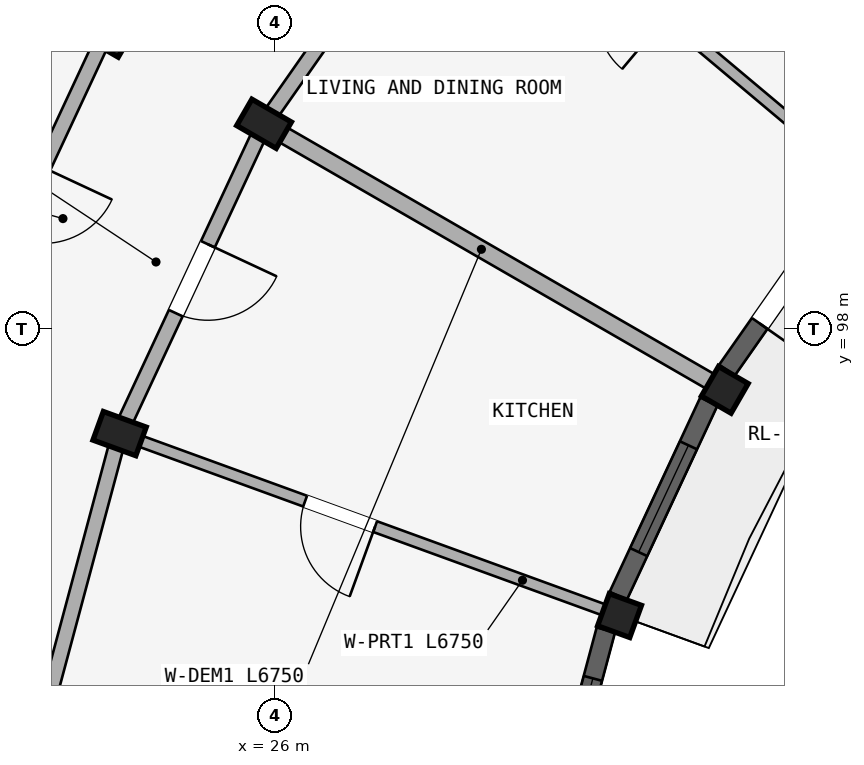
"""IFC4 building model, lengths in metres.
Left out: names, types, materials, properties, quantities, classifications, styles, units other than length and angle.
Written with IfcOpenShell. Run it as: python <this file> out.ifc"""

import sys

from ifc_helpers import new_model, si_unit, direction, frame, frame_2d, origin, origin_2d, place, context, subcontext, project, spatial, rectangle, extrude, element, fill, save


model = new_model("IFC4")
c1 = context("Model", 3, precision=1e-05, world=origin(), true_north=direction((0.0, 1.0)))
c2 = subcontext(c1, "Body", "Model", "MODEL_VIEW")
j1 = project(units=[si_unit("LENGTHUNIT", "METRE"), si_unit("PLANEANGLEUNIT", "RADIAN")], contexts=[c1])
p1 = place(None, origin())
s1 = spatial("IfcSite", under=j1, at=p1, CompositionType="ELEMENT")
p2 = place(p1, origin())
s2 = spatial("IfcBuilding", under=s1, at=p2, CompositionType="ELEMENT")
p3 = place(p2, frame((0.0, 0.0, 49.65)))
s3 = spatial("IfcBuildingStorey", under=s2, at=p3, CompositionType="ELEMENT", Elevation=49.65)
p4 = place(p3, frame((31.919, 97.2, 0.0), z_axis=(0.0, 0.0, 1.0), x_axis=(0.5, 0.866025403784, 0.0)))
e1 = element("IfcColumn", 1, at=p4, inside=s3, PredefinedType="COLUMN", context=c2, shape_type="SweptSolid", body=[
    extrude(rectangle(XDim=0.45, YDim=0.45, at=origin_2d()), origin(), (0.0, 0.0, 1.0), 2.91),
])
for number, where, z_axis, x_axis in (
    (2, (25.856, 100.7, 0.0), (0.0, 0.0, 1.0), (0.5, 0.866, 0.0)),
    (3, (23.778, 101.9, 0.0), (0.0, 0.0, 1.0), (0.5, 0.866, 0.0)),
):
    element("IfcColumn", number, at=place(p3, frame(where, z_axis=z_axis, x_axis=x_axis)), inside=s3, PredefinedType="COLUMN", context=c2, shape_type="SweptSolid", body=[
        extrude(rectangle(XDim=0.4, YDim=0.6, at=origin_2d()), origin(), (0.0, 0.0, 1.0), 2.91),
    ])
p5 = place(p3, frame((30.534, 94.23, 0.0), z_axis=(0.0, 0.0, 1.0), x_axis=(0.342020143326, 0.939692620786, 0.0)))
e4 = element("IfcColumn", 4, at=p5, inside=s3, PredefinedType="COLUMN", context=c2, shape_type="SweptSolid", body=[
    extrude(rectangle(XDim=0.45, YDim=0.45, at=origin_2d()), origin(), (0.0, 0.0, 1.0), 2.91),
])
p6 = place(p3, frame((23.956, 96.624, 0.0), z_axis=(0.0, 0.0, 1.0), x_axis=(0.342020143326, 0.939692620786, 0.0)))
e5 = element("IfcColumn", 5, at=p6, inside=s3, PredefinedType="COLUMN", context=c2, shape_type="SweptSolid", body=[
    extrude(rectangle(XDim=0.4, YDim=0.6, at=origin_2d()), origin(), (0.0, 0.0, 1.0), 2.91),
])
p7 = place(p3, frame((28.436, 104.384, 0.0), z_axis=(0.0, 0.0, 1.0), x_axis=(-0.573571637217, -0.819155404658, 0.0)))
e6 = element("IfcWall", 6, at=p7, inside=s3, PredefinedType="STANDARD", context=c2, shape_type="SweptSolid", body=[
    extrude(rectangle(XDim=4.497, YDim=0.2, at=frame_2d((2.249, 0.0))), origin(), (0.0, 0.0, 1.0), 2.352),
])
p8 = place(p3, frame((25.856, 100.7, 0.0), z_axis=(0.0, 0.0, 1.0), x_axis=(-0.422617978463, -0.906307919131, 0.0)))
e7 = element("IfcWall", 7, at=p8, inside=s3, PredefinedType="STANDARD", context=c2, shape_type="SweptSolid", body=[
    extrude(rectangle(XDim=4.497, YDim=0.2, at=frame_2d((2.249, 0.0))), origin(), (0.0, 0.0, 1.0), 2.352),
])
p9 = place(p8, frame((1.749, 0.0, 0.0)))
e8 = element("IfcOpeningElement", 8, at=p9, cuts=e7, PredefinedType="OPENING", context=c2, shape_type="SweptSolid", body=[
    extrude(rectangle(XDim=1.0, YDim=2.15, at=frame_2d((0.5, 1.075))), frame((0.0, 0.11, 0.0), z_axis=(0.0, -1.0, 0.0), x_axis=(1.0, 0.0, 0.0)), (0.0, 0.0, 1.0), 0.22),
])
p10 = place(p3, frame((23.778, 101.9, 0.0), z_axis=(0.0, 0.0, 1.0), x_axis=(-0.422629854778, -0.906302381024, 0.0)))
e9 = element("IfcWall", 9, at=p10, inside=s3, PredefinedType="STANDARD", context=c2, shape_type="SweptSolid", body=[
    extrude(rectangle(XDim=4.915, YDim=0.2, at=frame_2d((2.458, 0.0))), origin(), (0.0, 0.0, 1.0), 2.352),
])
p11 = place(p10, frame((1.958, 0.0, 0.0)))
e10 = element("IfcOpeningElement", 10, at=p11, cuts=e9, PredefinedType="OPENING", context=c2, shape_type="SweptSolid", body=[
    extrude(rectangle(XDim=1.0, YDim=2.15, at=frame_2d((0.5, 1.075))), frame((0.0, 0.11, 0.0), z_axis=(0.0, -1.0, 0.0), x_axis=(1.0, 0.0, 0.0)), (0.0, 0.0, 1.0), 0.22),
])
p12 = place(p3, frame((23.956, 96.624, 0.0), z_axis=(0.0, 0.0, 1.0), x_axis=(-0.258787642463, -0.965934240054, 0.0)))
e11 = element("IfcWall", 11, at=p12, inside=s3, PredefinedType="STANDARD", context=c2, shape_type="SweptSolid", body=[
    extrude(rectangle(XDim=4.497, YDim=0.2, at=frame_2d((2.249, 0.0))), origin(), (0.0, 0.0, 1.0), 2.352),
])
p13 = place(p3, frame((33.645, 100.013, 0.0), z_axis=(0.0, 0.0, 1.0), x_axis=(-0.766046761698, 0.642784846501, 0.0)))
e12 = element("IfcWall", 12, at=p13, inside=s3, PredefinedType="PARTITIONING", context=c2, shape_type="SweptSolid", body=[
    extrude(rectangle(XDim=6.75, YDim=0.15, at=frame_2d((3.375, 0.0))), origin(), (0.0, 0.0, 1.0), 2.352),
])
p14 = place(p13, frame((3.262, 0.0, 0.0)))
e13 = element("IfcOpeningElement", 13, at=p14, cuts=e12, PredefinedType="OPENING", context=c2, shape_type="SweptSolid", body=[
    extrude(rectangle(XDim=0.9, YDim=2.1, at=frame_2d((0.45, 1.05))), frame((0.0, 0.085, 0.0), z_axis=(0.0, -1.0, 0.0), x_axis=(1.0, 0.0, 0.0)), (0.0, 0.0, 1.0), 0.17),
])
p15 = place(p3, frame((31.746, 97.3, 0.0), z_axis=(0.0, 0.0, 1.0), x_axis=(-0.866026575979, 0.499997969693, 0.0)))
e14 = element("IfcWall", 14, at=p15, inside=s3, PredefinedType="STANDARD", context=c2, shape_type="SweptSolid", body=[
    extrude(rectangle(XDim=6.75, YDim=0.22, at=frame_2d((3.375, 0.0))), origin(), (0.0, 0.0, 1.0), 2.352),
])
p16 = place(p3, frame((30.346, 94.298, 0.0), z_axis=(0.0, 0.0, 1.0), x_axis=(-0.939696231917, 0.342010221662, 0.0)))
e15 = element("IfcWall", 15, at=p16, inside=s3, PredefinedType="PARTITIONING", context=c2, shape_type="SweptSolid", body=[
    extrude(rectangle(XDim=6.75, YDim=0.15, at=frame_2d((3.375, 0.0))), origin(), (0.0, 0.0, 1.0), 2.352),
])
p17 = place(p16, frame((3.222, 0.0, 0.0)))
e16 = element("IfcOpeningElement", 16, at=p17, cuts=e15, PredefinedType="OPENING", context=c2, shape_type="SweptSolid", body=[
    extrude(rectangle(XDim=0.98, YDim=2.12, at=frame_2d((0.49, 1.06))), frame((0.0, 0.085, 0.0), z_axis=(0.0, -1.0, 0.0), x_axis=(1.0, 0.0, 0.0)), (0.0, 0.0, 1.0), 0.17),
])
p18 = place(p3, frame((33.565, 99.769, 0.0), z_axis=(0.0, 0.0, 1.0), x_axis=(-0.573572722716, -0.819154644592, 0.0)))
e17 = element("IfcWall", 17, at=p18, inside=s3, PredefinedType="STANDARD", context=c2, shape_type="SweptSolid", body=[
    extrude(rectangle(XDim=2.82, YDim=0.25, at=frame_2d((1.41, 0.0))), origin(), (0.0, 0.0, 1.0), 2.402),
])
p19 = place(p18, frame((0.75, 0.0, 0.0)))
e18 = element("IfcOpeningElement", 18, at=p19, cuts=e17, PredefinedType="OPENING", context=c2, shape_type="SweptSolid", body=[
    extrude(rectangle(XDim=1.32, YDim=2.15, at=frame_2d((0.66, 1.075))), frame((0.0, 0.135, 0.0), z_axis=(0.0, -1.0, 0.0), x_axis=(1.0, 0.0, 0.0)), (0.0, 0.0, 1.0), 0.27),
])
p20 = place(p3, frame((31.709, 97.046, 0.0), z_axis=(0.0, 0.0, 1.0), x_axis=(-0.422667431484, -0.906284857185, 0.0)))
e19 = element("IfcWall", 19, at=p20, inside=s3, PredefinedType="STANDARD", context=c2, shape_type="SweptSolid", body=[
    extrude(rectangle(XDim=2.82, YDim=0.25, at=frame_2d((1.41, 0.0))), origin(), (0.0, 0.0, 1.0), 2.402),
])
p21 = place(p20, frame((0.635, 0.0, 0.602)))
e20 = element("IfcOpeningElement", 20, at=p21, cuts=e19, PredefinedType="OPENING", context=c2, shape_type="SweptSolid", body=[
    extrude(rectangle(XDim=1.55, YDim=1.6, at=frame_2d((0.775, 0.8))), frame((0.0, 0.135, 0.0), z_axis=(0.0, -1.0, 0.0), x_axis=(1.0, 0.0, 0.0)), (0.0, 0.0, 1.0), 0.27),
])
p22 = place(p3, frame((30.354, 94.042, 0.0), z_axis=(0.0, 0.0, 1.0), x_axis=(-0.258837049266, -0.965921001908, 0.0)))
e21 = element("IfcWall", 21, at=p22, inside=s3, PredefinedType="STANDARD", context=c2, shape_type="SweptSolid", body=[
    extrude(rectangle(XDim=2.82, YDim=0.25, at=frame_2d((1.41, 0.0))), origin(), (0.0, 0.0, 1.0), 2.402),
])
p23 = place(p22, frame((0.66, 0.0, 0.552)))
e22 = element("IfcOpeningElement", 22, at=p23, cuts=e21, PredefinedType="OPENING", context=c2, shape_type="SweptSolid", body=[
    extrude(rectangle(XDim=1.5, YDim=1.65, at=frame_2d((0.75, 0.825))), frame((0.0, 0.135, 0.0), z_axis=(0.0, -1.0, 0.0), x_axis=(1.0, 0.0, 0.0)), (0.0, 0.0, 1.0), 0.27),
])
p24 = place(p21, origin())
e23 = element("IfcWindow", 23, at=p24, inside=s3, PartitioningType="DOUBLE_PANEL_VERTICAL", PredefinedType="WINDOW", context=c2, shape_type="SweptSolid", body=[
    extrude(rectangle(XDim=1.55, YDim=1.6, at=frame_2d((0.775, 0.8))), frame((0.0, 0.03, 0.0), z_axis=(0.0, -1.0, 0.0), x_axis=(1.0, 0.0, 0.0)), (0.0, 0.0, 1.0), 0.06),
])
fill(e20, e23)
p25 = place(p23, origin())
e24 = element("IfcWindow", 24, at=p25, inside=s3, PartitioningType="DOUBLE_PANEL_VERTICAL", PredefinedType="WINDOW", context=c2, shape_type="SweptSolid", body=[
    extrude(rectangle(XDim=1.5, YDim=1.65, at=frame_2d((0.75, 0.825))), frame((0.0, 0.03, 0.0), z_axis=(0.0, -1.0, 0.0), x_axis=(1.0, 0.0, 0.0)), (0.0, 0.0, 1.0), 0.06),
])
fill(e22, e24)
p26 = place(p17, origin())
e25 = element("IfcDoor", 25, at=p26, inside=s3, OperationType="SINGLE_SWING_LEFT", PredefinedType="DOOR", context=c2, shape_type="SweptSolid", body=[
    extrude(rectangle(XDim=0.98, YDim=2.12, at=frame_2d((0.49, 1.06))), frame((0.0, 0.025, 0.0), z_axis=(0.0, -1.0, 0.0), x_axis=(1.0, 0.0, 0.0)), (0.0, 0.0, 1.0), 0.05),
])
fill(e16, e25)
p27 = place(p9, origin())
e26 = element("IfcDoor", 26, at=p27, inside=s3, OperationType="SINGLE_SWING_LEFT", PredefinedType="DOOR", context=c2, shape_type="SweptSolid", body=[
    extrude(rectangle(XDim=1.0, YDim=2.15, at=frame_2d((0.5, 1.075))), frame((0.0, 0.025, 0.0), z_axis=(0.0, -1.0, 0.0), x_axis=(1.0, 0.0, 0.0)), (0.0, 0.0, 1.0), 0.05),
])
fill(e8, e26)
p28 = place(p19, origin())
e27 = element("IfcDoor", 27, at=p28, inside=s3, OperationType="SINGLE_SWING_RIGHT", PredefinedType="DOOR", context=c2, shape_type="SweptSolid", body=[
    extrude(rectangle(XDim=1.32, YDim=2.15, at=frame_2d((0.66, 1.075))), frame((0.0, 0.025, 0.0), z_axis=(0.0, -1.0, 0.0), x_axis=(1.0, 0.0, 0.0)), (0.0, 0.0, 1.0), 0.05),
])
fill(e18, e27)
save(model, sys.argv[1])
